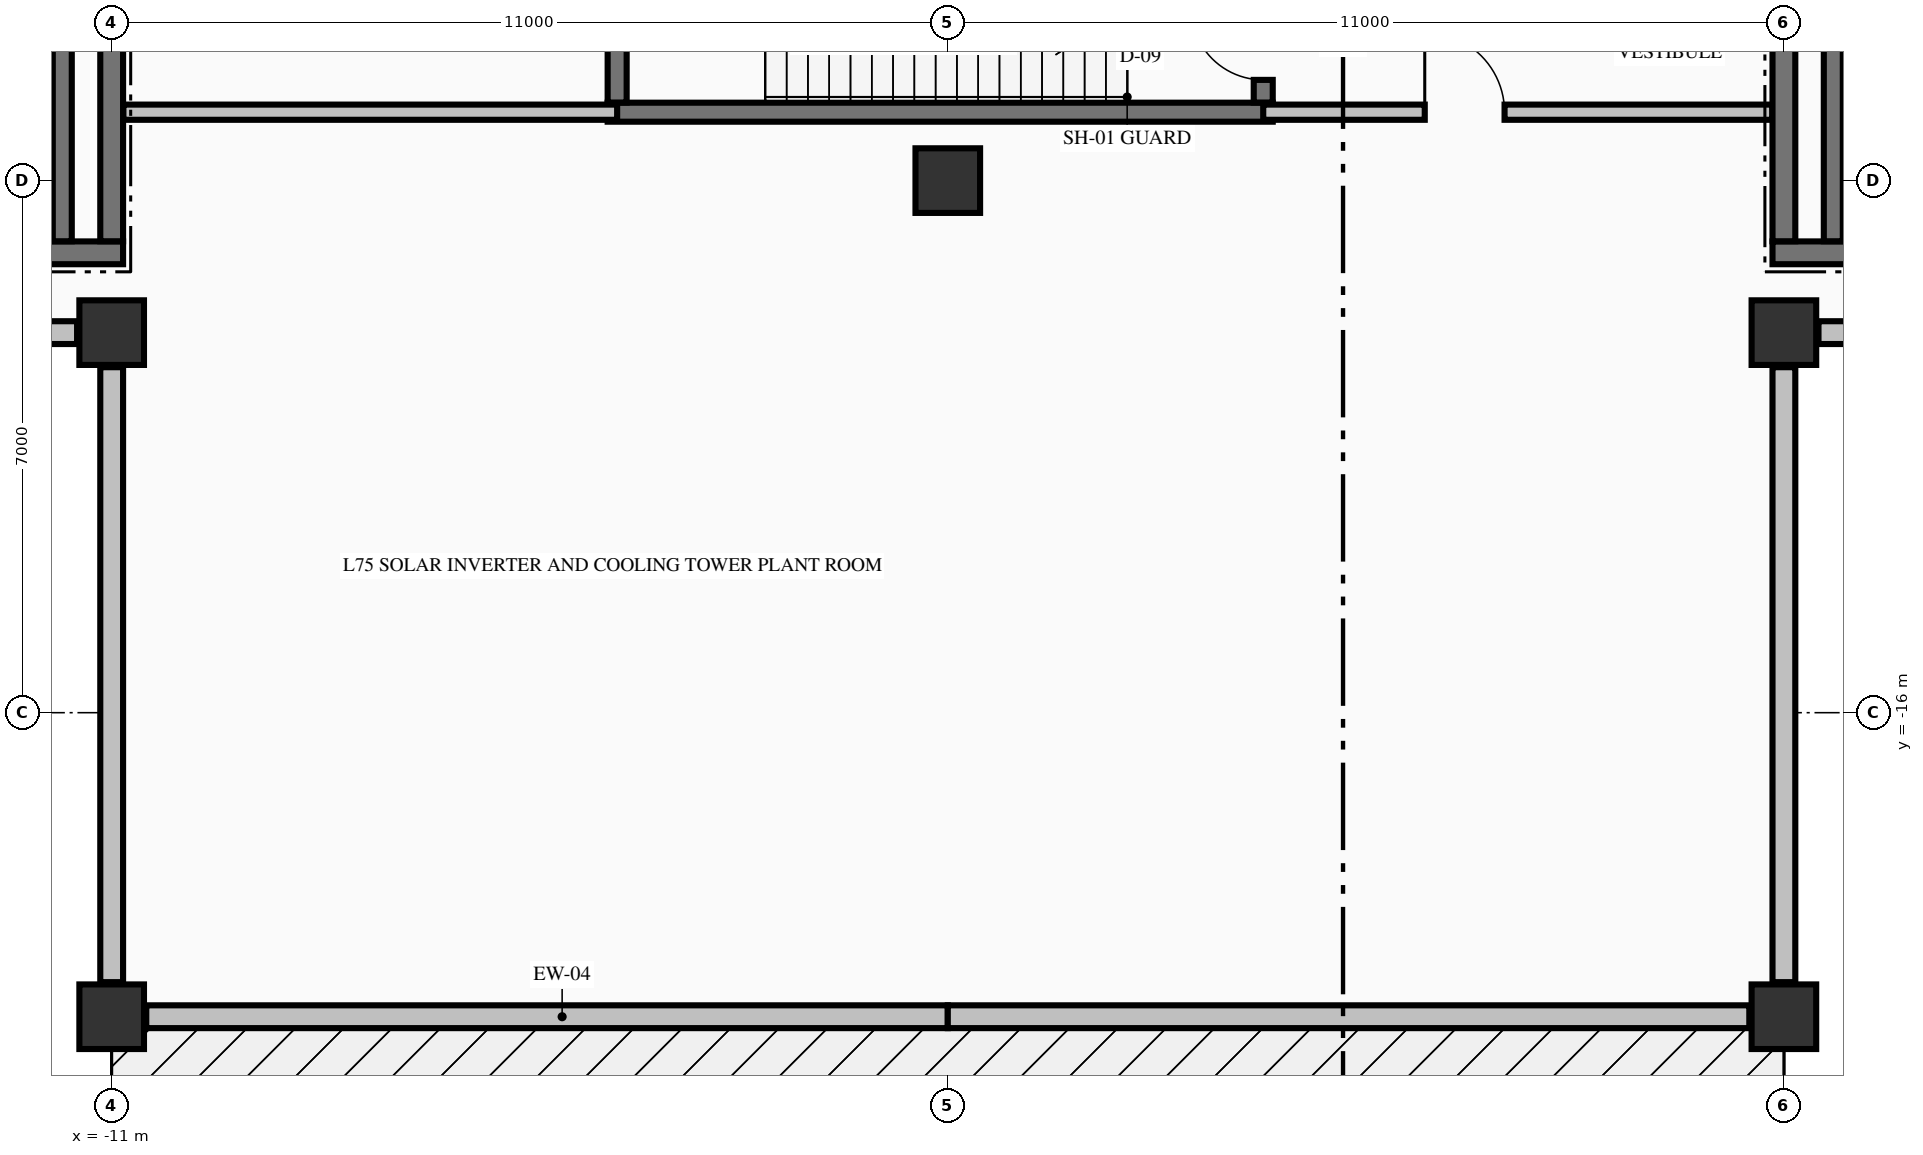
"""IFC4 building model, lengths in metres.
Left out: names, types, materials, properties, quantities, classifications, styles, units other than length and angle.
Written with IfcOpenShell. Run it as: python <this file> out.ifc"""

import sys

from ifc_helpers import new_model, si_unit, direction, frame, frame_2d, origin, origin_2d, place, context, subcontext, project, spatial, rectangle, extrude, element, fill, save


model = new_model("IFC4")
c1 = context("Model", 3, precision=1e-05, world=origin(), true_north=direction((0.0, 1.0)))
c2 = subcontext(c1, "Body", "Model", "MODEL_VIEW")
j1 = project(units=[si_unit("LENGTHUNIT", "METRE"), si_unit("PLANEANGLEUNIT", "RADIAN")], contexts=[c1])
p1 = place(None, origin())
s1 = spatial("IfcSite", under=j1, at=p1, CompositionType="ELEMENT")
p2 = place(p1, origin())
s2 = spatial("IfcBuilding", under=s1, at=p2, CompositionType="ELEMENT")
p3 = place(p2, frame((0.0, 0.0, 281.8)))
s3 = spatial("IfcBuildingStorey", under=s2, at=p3, CompositionType="ELEMENT", Elevation=281.8)
for number, where, z_axis, x_axis in (
    (1, (-11.0, -20.0, -0.325), (0.0, 0.0, 1.0), (1.0, 0.0, 0.0)),
    (2, (11.0, -20.0, -0.325), (0.0, 0.0, 1.0), (1.0, 0.0, 0.0)),
    (3, (-11.0, -11.0, -0.325), (0.0, 0.0, 1.0), (1.0, 0.0, 0.0)),
    (4, (11.0, -11.0, -0.325), (0.0, 0.0, 1.0), (1.0, 0.0, 0.0)),
    (5, (0.0, -9.0, -0.325), (0.0, 0.0, 1.0), (1.0, 0.0, 0.0)),
):
    element("IfcColumn", number, at=place(p3, frame(where, z_axis=z_axis, x_axis=x_axis)), inside=s3, PredefinedType="COLUMN", context=c2, shape_type="SweptSolid", body=[
        extrude(rectangle(XDim=0.85, YDim=0.85, at=origin_2d()), origin(), (0.0, 0.0, 1.0), 3.06),
    ])
for number, where, z_axis, x_axis in (
    (6, (-10.545, -20.0, 0.0), (0.0, 0.0, 1.0), (1.0, 0.0, 0.0)),
    (7, (0.0, -20.0, 0.0), (0.0, 0.0, 1.0), (1.0, 0.0, 0.0)),
):
    element("IfcWall", number, at=place(p3, frame(where, z_axis=z_axis, x_axis=x_axis)), inside=s3, PredefinedType="STANDARD", context=c2, shape_type="SweptSolid", body=[
        extrude(rectangle(XDim=10.545, YDim=0.3, at=frame_2d((5.272, 0.0))), origin(), (0.0, 0.0, 1.0), 2.127),
    ])
p4 = place(p3, frame((11.0, -19.545, 0.0), z_axis=(0.0, 0.0, 1.0), x_axis=(0.0, 1.0, 0.0)))
e8 = element("IfcWall", 8, at=p4, inside=s3, PredefinedType="STANDARD", context=c2, shape_type="SweptSolid", body=[
    extrude(rectangle(XDim=8.09, YDim=0.3, at=frame_2d((4.045, 0.0))), origin(), (0.0, 0.0, 1.0), 0.927),
])
for number, where, z_axis, x_axis in (
    (9, (11.455, -11.0, 0.0), (0.0, 0.0, 1.0), (1.0, 0.0, 0.0)),
    (10, (-19.545, -11.0, 0.0), (0.0, 0.0, 1.0), (1.0, 0.0, 0.0)),
):
    element("IfcWall", number, at=place(p3, frame(where, z_axis=z_axis, x_axis=x_axis)), inside=s3, PredefinedType="STANDARD", context=c2, shape_type="SweptSolid", body=[
        extrude(rectangle(XDim=8.09, YDim=0.3, at=frame_2d((4.045, 0.0))), origin(), (0.0, 0.0, 1.0), 1.077),
    ])
p5 = place(p3, frame((-11.0, -11.455, 0.0), z_axis=(0.0, 0.0, 1.0), x_axis=(0.0, -1.0, 0.0)))
e11 = element("IfcWall", 11, at=p5, inside=s3, PredefinedType="STANDARD", context=c2, shape_type="SweptSolid", body=[
    extrude(rectangle(XDim=8.09, YDim=0.3, at=frame_2d((4.045, 0.0))), origin(), (0.0, 0.0, 1.0), 0.927),
])
for number, where, z_axis, x_axis in (
    (12, (-14.85, -9.95, 0.0), (0.0, 0.0, 1.0), (1.0, 0.0, 0.0)),
    (13, (10.85, -9.95, 0.0), (0.0, 0.0, 1.0), (1.0, 0.0, 0.0)),
):
    element("IfcWall", number, at=place(p3, frame(where, z_axis=z_axis, x_axis=x_axis)), inside=s3, PredefinedType="SHEAR", context=c2, shape_type="SweptSolid", body=[
        extrude(rectangle(XDim=4.0, YDim=0.3, at=frame_2d((2.0, 0.0))), origin(), (0.0, 0.0, 1.0), 2.735),
    ])
p6 = place(p3, frame((-4.475, -8.1, 0.0), z_axis=(0.0, 0.0, 1.0), x_axis=(1.0, 0.0, 0.0)))
e14 = element("IfcWall", 14, at=p6, inside=s3, PredefinedType="SOLIDWALL", context=c2, shape_type="SweptSolid", body=[
    extrude(rectangle(XDim=8.75, YDim=0.25, at=frame_2d((4.375, 0.0))), origin(), (0.0, 0.0, 1.0), 2.735),
])
p7 = place(p3, frame((-10.847, -8.1, 0.0), z_axis=(0.0, 0.0, 1.0), x_axis=(1.0, 0.0, 0.0)))
e15 = element("IfcWall", 15, at=p7, inside=s3, PredefinedType="PARTITIONING", context=c2, shape_type="SweptSolid", body=[
    extrude(rectangle(XDim=6.497, YDim=0.2, at=frame_2d((3.249, 0.0))), origin(), (0.0, 0.0, 1.0), 2.735),
])
p8 = place(p3, frame((4.15, -8.1, 0.0), z_axis=(0.0, 0.0, 1.0), x_axis=(1.0, 0.0, 0.0)))
e16 = element("IfcWall", 16, at=p8, inside=s3, PredefinedType="PARTITIONING", context=c2, shape_type="SweptSolid", body=[
    extrude(rectangle(XDim=6.697, YDim=0.2, at=frame_2d((3.349, 0.0))), origin(), (0.0, 0.0, 1.0), 2.735),
])
p9 = place(p8, frame((2.125, 0.0, 0.0)))
e17 = element("IfcOpeningElement", 17, at=p9, cuts=e16, PredefinedType="OPENING", context=c2, shape_type="SweptSolid", body=[
    extrude(rectangle(XDim=1.05, YDim=2.15, at=frame_2d((0.525, 1.075))), frame((0.0, 0.11, 0.0), z_axis=(0.0, -1.0, 0.0), x_axis=(1.0, 0.0, 0.0)), (0.0, 0.0, 1.0), 0.22),
])
p10 = place(p3, frame((-11.65, -9.798, 0.0), z_axis=(0.0, 0.0, 1.0), x_axis=(0.0, 1.0, 0.0)))
e18 = element("IfcWall", 18, at=p10, inside=s3, PredefinedType="SOLIDWALL", context=c2, shape_type="SweptSolid", body=[
    extrude(rectangle(XDim=9.396, YDim=0.25, at=frame_2d((4.698, 0.0))), origin(), (0.0, 0.0, 1.0), 2.735),
])
p11 = place(p3, frame((-11.0, -9.798, 0.0), z_axis=(0.0, 0.0, 1.0), x_axis=(0.0, 1.0, 0.0)))
e19 = element("IfcWall", 19, at=p11, inside=s3, PredefinedType="SHEAR", context=c2, shape_type="SweptSolid", body=[
    extrude(rectangle(XDim=9.369, YDim=0.3, at=frame_2d((4.685, 0.0))), origin(), (0.0, 0.0, 1.0), 2.735),
])
p12 = place(p3, frame((-4.35, -7.973, 0.0), z_axis=(0.0, 0.0, 1.0), x_axis=(0.0, 1.0, 0.0)))
e20 = element("IfcWall", 20, at=p12, inside=s3, PredefinedType="SOLIDWALL", context=c2, shape_type="SweptSolid", body=[
    extrude(rectangle(XDim=1.546, YDim=0.25, at=frame_2d((0.773, 0.0))), origin(), (0.0, 0.0, 1.0), 2.735),
])
p13 = place(p3, frame((4.15, -7.973, 0.0), z_axis=(0.0, 0.0, 1.0), x_axis=(0.0, 1.0, 0.0)))
e21 = element("IfcWall", 21, at=p13, inside=s3, PredefinedType="SOLIDWALL", context=c2, shape_type="SweptSolid", body=[
    extrude(rectangle(XDim=1.546, YDim=0.25, at=frame_2d((0.773, 0.0))), origin(), (0.0, 0.0, 1.0), 2.735),
])
p14 = place(p13, frame((0.298, 0.0, 0.0)))
e22 = element("IfcOpeningElement", 22, at=p14, cuts=e21, PredefinedType="OPENING", context=c2, shape_type="SweptSolid", body=[
    extrude(rectangle(XDim=0.95, YDim=2.15, at=frame_2d((0.475, 1.075))), frame((0.0, 0.135, 0.0), z_axis=(0.0, -1.0, 0.0), x_axis=(1.0, 0.0, 0.0)), (0.0, 0.0, 1.0), 0.27),
])
p15 = place(p3, frame((11.0, -9.798, 0.0), z_axis=(0.0, 0.0, 1.0), x_axis=(0.0, 1.0, 0.0)))
e23 = element("IfcWall", 23, at=p15, inside=s3, PredefinedType="SHEAR", context=c2, shape_type="SweptSolid", body=[
    extrude(rectangle(XDim=9.369, YDim=0.3, at=frame_2d((4.685, 0.0))), origin(), (0.0, 0.0, 1.0), 2.735),
])
p16 = place(p3, frame((11.65, -9.798, 0.0), z_axis=(0.0, 0.0, 1.0), x_axis=(0.0, 1.0, 0.0)))
e24 = element("IfcWall", 24, at=p16, inside=s3, PredefinedType="SOLIDWALL", context=c2, shape_type="SweptSolid", body=[
    extrude(rectangle(XDim=9.396, YDim=0.25, at=frame_2d((4.698, 0.0))), origin(), (0.0, 0.0, 1.0), 2.735),
])
p17 = place(p14, origin())
e25 = element("IfcDoor", 25, at=p17, inside=s3, OperationType="SINGLE_SWING_RIGHT", PredefinedType="DOOR", context=c2, shape_type="SweptSolid", body=[
    extrude(rectangle(XDim=0.95, YDim=2.15, at=frame_2d((0.475, 1.075))), frame((0.0, 0.025, 0.0), z_axis=(0.0, -1.0, 0.0), x_axis=(1.0, 0.0, 0.0)), (0.0, 0.0, 1.0), 0.05),
])
fill(e22, e25)
p18 = place(p9, origin())
e26 = element("IfcDoor", 26, at=p18, inside=s3, OperationType="SINGLE_SWING_LEFT", PredefinedType="DOOR", context=c2, shape_type="SweptSolid", body=[
    extrude(rectangle(XDim=1.05, YDim=2.15, at=frame_2d((0.525, 1.075))), frame((0.0, 0.025, 0.0), z_axis=(0.0, -1.0, 0.0), x_axis=(1.0, 0.0, 0.0)), (0.0, 0.0, 1.0), 0.05),
])
fill(e17, e26)
save(model, sys.argv[1])
